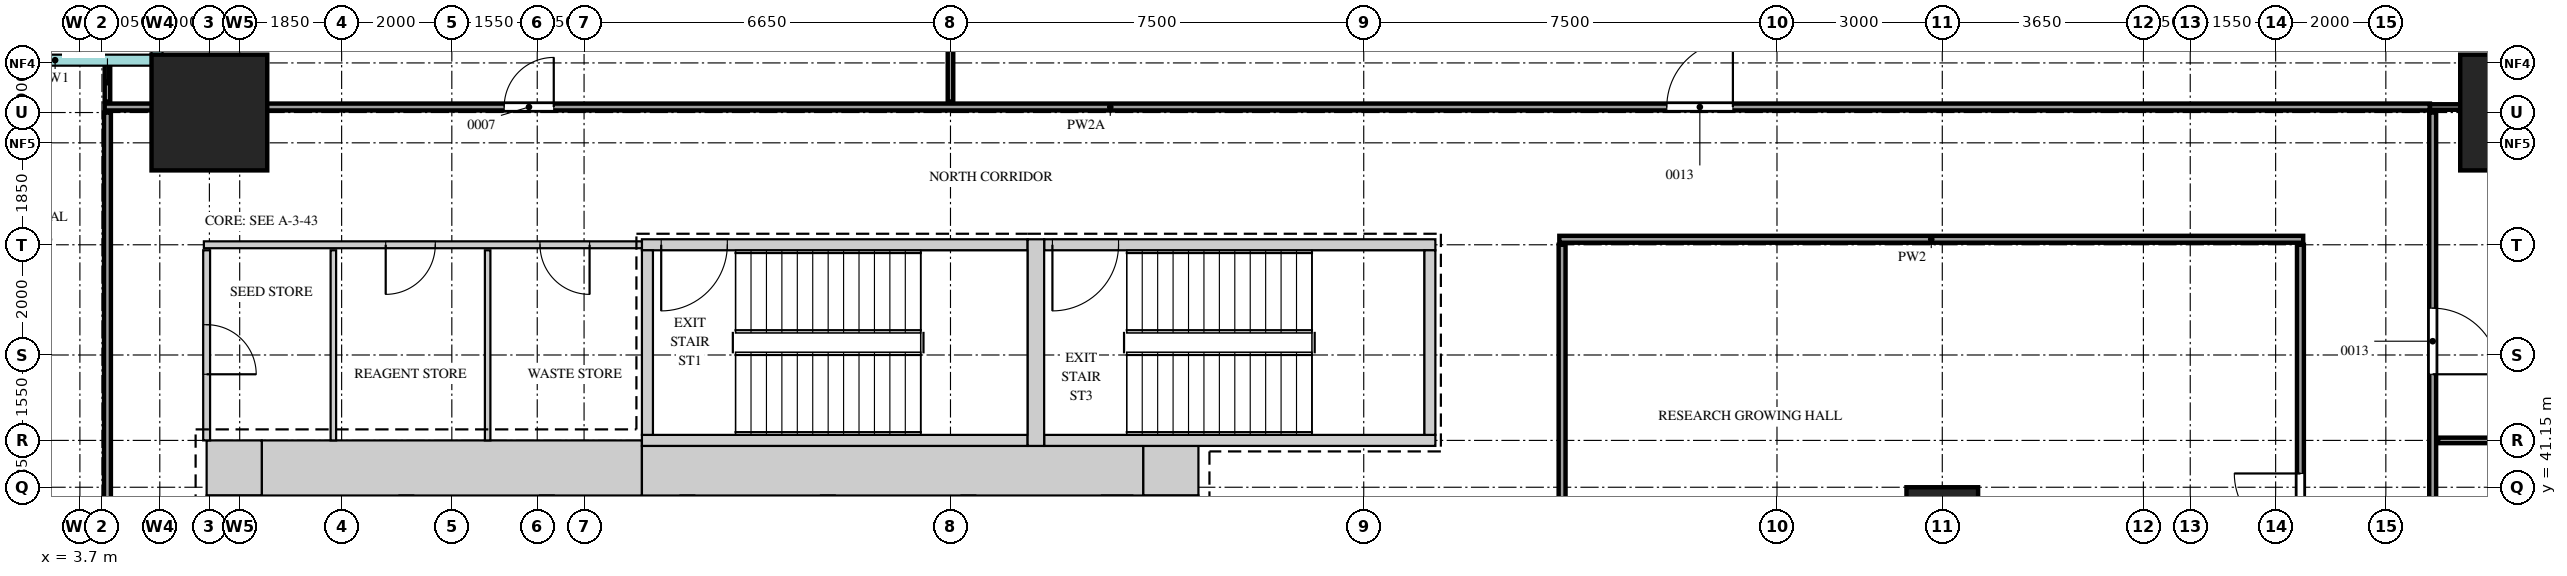
"""IFC4 building model, lengths in metres.
Left out: names, types, materials, properties, quantities, classifications, styles, units other than length and angle.
Written with IfcOpenShell. Run it as: python <this file> out.ifc"""

import sys

from ifc_helpers import new_model, si_unit, direction, frame, frame_2d, origin, origin_2d, place, context, subcontext, project, spatial, rectangle, extrude, source, transform, mapped, element, fill, save


model = new_model("IFC4")
c1 = context("Model", 3, precision=1e-05, world=origin(), true_north=direction((0.0, 1.0)))
c2 = subcontext(c1, "Body", "Model", "MODEL_VIEW")
j1 = project(units=[si_unit("LENGTHUNIT", "METRE"), si_unit("PLANEANGLEUNIT", "RADIAN")], contexts=[c1])
p1 = place(None, origin())
s1 = spatial("IfcSite", under=j1, at=p1, CompositionType="ELEMENT")
p2 = place(p1, origin())
s2 = spatial("IfcBuilding", under=s1, at=p2, CompositionType="ELEMENT")
p3 = place(p2, frame((0.0, 0.0, 105.9)))
s3 = spatial("IfcBuildingStorey", under=s2, at=p3, CompositionType="ELEMENT", Elevation=105.9)
m1 = source(origin(), c2, "Body", "SweptSolid", [
    extrude(rectangle(XDim=6.9, YDim=1.0, at=frame_2d((3.45, 0.0))), origin(), (0.0, 0.0, 1.0), 4.1),
])
p4 = place(p3, frame((7.0, 41.5, 0.0), z_axis=(0.0, 0.0, 1.0), x_axis=(1.0, 0.0, 0.0)))
e1 = element("IfcWall", 1, at=p4, inside=s3, PredefinedType="SHEAR", context=c2, shape_type="MappedRepresentation", body=[
    mapped(m1, transform((0.0, 0.0, 0.0))),
])
m2 = source(origin(), c2, "Body", "SweptSolid", [
    extrude(rectangle(XDim=9.1, YDim=0.9, at=frame_2d((4.55, 0.0))), origin(), (0.0, 0.0, 1.0), 4.1),
])
p5 = place(p3, frame((13.9, 41.45, 0.0), z_axis=(0.0, 0.0, 1.0), x_axis=(1.0, 0.0, 0.0)))
e2 = element("IfcWall", 2, at=p5, inside=s3, PredefinedType="SHEAR", context=c2, shape_type="MappedRepresentation", body=[
    mapped(m2, transform((0.0, 0.0, 0.0))),
])
m3 = source(origin(), c2, "Body", "SweptSolid", [
    extrude(rectangle(XDim=1.0, YDim=0.9, at=frame_2d((0.5, 0.0))), origin(), (0.0, 0.0, 1.0), 4.1),
])
p6 = place(p3, frame((23.0, 41.45, 0.0), z_axis=(0.0, 0.0, 1.0), x_axis=(1.0, 0.0, 0.0)))
e3 = element("IfcWall", 3, at=p6, inside=s3, PredefinedType="SHEAR", context=c2, shape_type="MappedRepresentation", body=[
    mapped(m3, transform((0.0, 0.0, 0.0))),
])
m4 = source(origin(), c2, "Body", "SweptSolid", [
    extrude(rectangle(XDim=1.0, YDim=1.0, at=frame_2d((0.5, 0.0))), origin(), (0.0, 0.0, 1.0), 4.1),
])
p7 = place(p3, frame((6.0, 41.5, 0.0), z_axis=(0.0, 0.0, 1.0), x_axis=(1.0, 0.0, 0.0)))
e4 = element("IfcWall", 4, at=p7, inside=s3, PredefinedType="SHEAR", context=c2, shape_type="MappedRepresentation", body=[
    mapped(m4, transform((0.0, 0.0, 0.0))),
])
m5 = source(origin(), c2, "Body", "SweptSolid", [
    extrude(rectangle(XDim=7.0, YDim=0.2, at=frame_2d((3.5, 0.0))), origin(), (0.0, 0.0, 1.0), 4.1),
])
p8 = place(p3, frame((13.9, 45.55, 0.0), z_axis=(0.0, 0.0, 1.0), x_axis=(1.0, 0.0, 0.0)))
e5 = element("IfcWall", 5, at=p8, inside=s3, PredefinedType="SHEAR", context=c2, shape_type="MappedRepresentation", body=[
    mapped(m5, transform((0.0, 0.0, 0.0))),
])
m6 = source(origin(), c2, "Body", "SweptSolid", [
    extrude(rectangle(XDim=1.2, YDim=2.1, at=frame_2d((0.6, 1.05))), frame((0.0, 0.11, 0.0), z_axis=(0.0, -1.0, 0.0), x_axis=(1.0, 0.0, 0.0)), (0.0, 0.0, 1.0), 0.22),
])
p9 = place(p8, frame((0.35, 0.0, 0.0)))
e6 = element("IfcOpeningElement", 6, at=p9, cuts=e5, PredefinedType="OPENING", context=c2, shape_type="MappedRepresentation", body=[
    mapped(m6, transform((0.0, 0.0, 0.0))),
])
p10 = place(p3, frame((13.9, 42.0, 0.0), z_axis=(0.0, 0.0, 1.0), x_axis=(1.0, 0.0, 0.0)))
e7 = element("IfcWall", 7, at=p10, inside=s3, PredefinedType="SHEAR", context=c2, shape_type="MappedRepresentation", body=[
    mapped(m5, transform((0.0, 0.0, 0.0))),
])
m7 = source(origin(), c2, "Body", "SweptSolid", [
    extrude(rectangle(XDim=7.1, YDim=0.2, at=frame_2d((3.55, 0.0))), origin(), (0.0, 0.0, 1.0), 4.1),
])
p11 = place(p3, frame((21.2, 45.55, 0.0), z_axis=(0.0, 0.0, 1.0), x_axis=(1.0, 0.0, 0.0)))
e8 = element("IfcWall", 8, at=p11, inside=s3, PredefinedType="SHEAR", context=c2, shape_type="MappedRepresentation", body=[
    mapped(m7, transform((0.0, 0.0, 0.0))),
])
p12 = place(p11, frame((0.15, 0.0, 0.0)))
e9 = element("IfcOpeningElement", 9, at=p12, cuts=e8, PredefinedType="OPENING", context=c2, shape_type="MappedRepresentation", body=[
    mapped(m6, transform((0.0, 0.0, 0.0))),
])
p13 = place(p3, frame((21.2, 42.0, 0.0), z_axis=(0.0, 0.0, 1.0), x_axis=(1.0, 0.0, 0.0)))
e10 = element("IfcWall", 10, at=p13, inside=s3, PredefinedType="SHEAR", context=c2, shape_type="MappedRepresentation", body=[
    mapped(m7, transform((0.0, 0.0, 0.0))),
])
m8 = source(origin(), c2, "Body", "SweptSolid", [
    extrude(rectangle(XDim=3.75, YDim=0.3, at=frame_2d((1.875, 0.0))), origin(), (0.0, 0.0, 1.0), 4.1),
])
p14 = place(p3, frame((21.05, 41.9, 0.0), z_axis=(0.0, 0.0, 1.0), x_axis=(0.0, 1.0, 0.0)))
e11 = element("IfcWall", 11, at=p14, inside=s3, PredefinedType="SHEAR", context=c2, shape_type="MappedRepresentation", body=[
    mapped(m8, transform((0.0, 0.0, 0.0))),
])
m9 = source(origin(), c2, "Body", "SweptSolid", [
    extrude(rectangle(XDim=3.35, YDim=0.2, at=frame_2d((1.675, 0.0))), origin(), (0.0, 0.0, 1.0), 4.1),
])
for number, where, z_axis, x_axis in (
    (12, (14.0, 42.1, 0.0), (0.0, 0.0, 1.0), (0.0, 1.0, 0.0)),
    (13, (28.2, 42.1, 0.0), (0.0, 0.0, 1.0), (0.0, 1.0, 0.0)),
):
    element("IfcWall", number, at=place(p3, frame(where, z_axis=z_axis, x_axis=x_axis)), inside=s3, PredefinedType="SHEAR", context=c2, shape_type="MappedRepresentation", body=[
        mapped(m9, transform((0.0, 0.0, 0.0))),
    ])
m10 = source(origin(), c2, "Body", "SweptSolid", [
    extrude(rectangle(XDim=2.1, YDim=2.1, at=origin_2d()), origin(), (0.0, 0.0, 1.0), 4.4),
])
for number, where, z_axis, x_axis in (
    (14, (47.95, 47.95, 0.0), (0.0, 0.0, 1.0), (1.0, 0.0, 0.0)),
    (15, (6.05, 47.95, 0.0), (0.0, 0.0, 1.0), (1.0, 0.0, 0.0)),
):
    element("IfcColumn", number, at=place(p3, frame(where, z_axis=z_axis, x_axis=x_axis)), inside=s3, PredefinedType="COLUMN", context=c2, shape_type="MappedRepresentation", body=[
        mapped(m10, transform((0.0, 0.0, 0.0))),
    ])
m11 = source(origin(), c2, "Body", "SweptSolid", [
    extrude(rectangle(XDim=1.3, YDim=1.3, at=origin_2d()), origin(), (0.0, 0.0, 1.0), 4.1),
])
p15 = place(p3, frame((37.5, 40.5, 0.0), z_axis=(0.0, 0.0, 1.0), x_axis=(1.0, 0.0, 0.0)))
e16 = element("IfcColumn", 16, at=p15, inside=s3, PredefinedType="COLUMN", context=c2, shape_type="MappedRepresentation", body=[
    mapped(m11, transform((0.0, 0.0, 0.0))),
])
m12 = source(origin(), c2, "Body", "SweptSolid", [
    extrude(rectangle(XDim=41.8, YDim=0.125, at=frame_2d((20.9, 0.0))), origin(), (0.0, 0.0, 1.0), 4.2),
])
p16 = place(p3, frame((4.2, 6.15, 0.0), z_axis=(0.0, 0.0, 1.0), x_axis=(0.0, 1.0, 0.0)))
e17 = element("IfcWall", 17, at=p16, inside=s3, PredefinedType="PARTITIONING", context=c2, shape_type="MappedRepresentation", body=[
    mapped(m12, transform((0.0, 0.0, 0.0))),
])
m13 = source(origin(), c2, "Body", "SweptSolid", [
    extrude(rectangle(XDim=0.9, YDim=2.1, at=frame_2d((0.45, 1.05))), frame((0.0, 0.073, 0.0), z_axis=(0.0, -1.0, 0.0), x_axis=(1.0, 0.0, 0.0)), (0.0, 0.0, 1.0), 0.145),
])
p17 = place(p16, frame((7.2, 0.0, 0.0)))
e18 = element("IfcOpeningElement", 18, at=p17, cuts=e17, PredefinedType="OPENING", context=c2, shape_type="MappedRepresentation", body=[
    mapped(m13, transform((0.0, 0.0, 0.0))),
])
p18 = place(p16, frame((21.8, 0.0, 0.0)))
e19 = element("IfcOpeningElement", 19, at=p18, cuts=e17, PredefinedType="OPENING", context=c2, shape_type="MappedRepresentation", body=[
    mapped(m13, transform((0.0, 0.0, 0.0))),
])
p19 = place(p16, frame((33.3, 0.0, 0.0)))
e20 = element("IfcOpeningElement", 20, at=p19, cuts=e17, PredefinedType="OPENING", context=c2, shape_type="MappedRepresentation", body=[
    mapped(m13, transform((0.0, 0.0, 0.0))),
])
m14 = source(origin(), c2, "Body", "SweptSolid", [
    extrude(rectangle(XDim=37.65, YDim=0.125, at=frame_2d((18.825, 0.0))), origin(), (0.0, 0.0, 1.0), 4.2),
])
p20 = place(p3, frame((46.4, 10.3, 0.0), z_axis=(0.0, 0.0, 1.0), x_axis=(0.0, 1.0, 0.0)))
e21 = element("IfcWall", 21, at=p20, inside=s3, PredefinedType="PARTITIONING", context=c2, shape_type="MappedRepresentation", body=[
    mapped(m14, transform((0.0, 0.0, 0.0))),
])
m15 = source(origin(), c2, "Body", "SweptSolid", [
    extrude(rectangle(XDim=1.2, YDim=2.1, at=frame_2d((0.6, 1.05))), frame((0.0, 0.073, 0.0), z_axis=(0.0, -1.0, 0.0), x_axis=(1.0, 0.0, 0.0)), (0.0, 0.0, 1.0), 0.145),
])
p21 = place(p20, frame((7.85, 0.0, 0.0)))
e22 = element("IfcOpeningElement", 22, at=p21, cuts=e21, PredefinedType="OPENING", context=c2, shape_type="MappedRepresentation", body=[
    mapped(m15, transform((0.0, 0.0, 0.0))),
])
p22 = place(p20, frame((23.6, 0.0, 0.0)))
e23 = element("IfcOpeningElement", 23, at=p22, cuts=e21, PredefinedType="OPENING", context=c2, shape_type="MappedRepresentation", body=[
    mapped(m15, transform((0.0, 0.0, 0.0))),
])
p23 = place(p20, frame((32.9, 0.0, 0.0)))
e24 = element("IfcOpeningElement", 24, at=p23, cuts=e21, PredefinedType="OPENING", context=c2, shape_type="MappedRepresentation", body=[
    mapped(m15, transform((0.0, 0.0, 0.0))),
])
m16 = source(origin(), c2, "Body", "SweptSolid", [
    extrude(rectangle(XDim=32.85, YDim=0.125, at=frame_2d((16.425, 0.0))), origin(), (0.0, 0.0, 1.0), 4.2),
])
p24 = place(p3, frame((44.0, 12.7, 0.0), z_axis=(0.0, 0.0, 1.0), x_axis=(0.0, 1.0, 0.0)))
e25 = element("IfcWall", 25, at=p24, inside=s3, PredefinedType="PARTITIONING", context=c2, shape_type="MappedRepresentation", body=[
    mapped(m16, transform((0.0, 0.0, 0.0))),
])
p25 = place(p24, frame((9.2, 0.0, 0.0)))
e26 = element("IfcOpeningElement", 26, at=p25, cuts=e25, PredefinedType="OPENING", context=c2, shape_type="MappedRepresentation", body=[
    mapped(m15, transform((0.0, 0.0, 0.0))),
])
p26 = place(p24, frame((27.5, 0.0, 0.0)))
e27 = element("IfcOpeningElement", 27, at=p26, cuts=e25, PredefinedType="OPENING", context=c2, shape_type="MappedRepresentation", body=[
    mapped(m15, transform((0.0, 0.0, 0.0))),
])
m17 = source(origin(), c2, "Body", "SweptSolid", [
    extrude(rectangle(XDim=9.45, YDim=0.125, at=frame_2d((4.725, 0.0))), origin(), (0.0, 0.0, 1.0), 4.2),
])
p27 = place(p3, frame((30.6, 36.1, 0.0), z_axis=(0.0, 0.0, 1.0), x_axis=(0.0, 1.0, 0.0)))
e28 = element("IfcWall", 28, at=p27, inside=s3, PredefinedType="PARTITIONING", context=c2, shape_type="MappedRepresentation", body=[
    mapped(m17, transform((0.0, 0.0, 0.0))),
])
m18 = source(origin(), c2, "Body", "SweptSolid", [
    extrude(rectangle(XDim=3.45, YDim=0.125, at=frame_2d((1.725, 0.0))), origin(), (0.0, 0.0, 1.0), 4.2),
])
p28 = place(p3, frame((6.0, 42.0, 0.0), z_axis=(0.0, 0.0, 1.0), x_axis=(0.0, 1.0, 0.0)))
e29 = element("IfcWall", 29, at=p28, inside=s3, PredefinedType="PARTITIONING", context=c2, shape_type="MappedRepresentation", body=[
    mapped(m18, transform((0.0, 0.0, 0.0))),
])
p29 = place(p28, frame((1.2, 0.0, 0.0)))
e30 = element("IfcOpeningElement", 30, at=p29, cuts=e29, PredefinedType="OPENING", context=c2, shape_type="MappedRepresentation", body=[
    mapped(m13, transform((0.0, 0.0, 0.0))),
])
m19 = source(origin(), c2, "Body", "SweptSolid", [
    extrude(rectangle(XDim=3.45, YDim=0.1, at=frame_2d((1.725, 0.0))), origin(), (0.0, 0.0, 1.0), 4.2),
])
for number, where, z_axis, x_axis in (
    (31, (8.3, 42.0, 0.0), (0.0, 0.0, 1.0), (0.0, 1.0, 0.0)),
    (32, (11.1, 42.0, 0.0), (0.0, 0.0, 1.0), (0.0, 1.0, 0.0)),
):
    element("IfcWall", number, at=place(p3, frame(where, z_axis=z_axis, x_axis=x_axis)), inside=s3, PredefinedType="PARTITIONING", context=c2, shape_type="MappedRepresentation", body=[
        mapped(m19, transform((0.0, 0.0, 0.0))),
    ])
m20 = source(origin(), c2, "Body", "SweptSolid", [
    extrude(rectangle(XDim=5.85, YDim=0.1, at=frame_2d((2.925, 0.0))), origin(), (0.0, 0.0, 1.0), 4.2),
])
p30 = place(p3, frame((46.5, 42.0, 0.0), z_axis=(0.0, 0.0, 1.0), x_axis=(1.0, 0.0, 0.0)))
e33 = element("IfcWall", 33, at=p30, inside=s3, PredefinedType="PARTITIONING", context=c2, shape_type="MappedRepresentation", body=[
    mapped(m20, transform((0.0, 0.0, 0.0))),
])
m21 = source(origin(), c2, "Body", "SweptSolid", [
    extrude(rectangle(XDim=7.95, YDim=0.125, at=frame_2d((3.975, 0.0))), origin(), (0.0, 0.0, 1.0), 4.2),
])
p31 = place(p3, frame((5.95, 45.55, 0.0), z_axis=(0.0, 0.0, 1.0), x_axis=(1.0, 0.0, 0.0)))
e34 = element("IfcWall", 34, at=p31, inside=s3, PredefinedType="PARTITIONING", context=c2, shape_type="MappedRepresentation", body=[
    mapped(m21, transform((0.0, 0.0, 0.0))),
])
p32 = place(p31, frame((3.3, 0.0, 0.0)))
e35 = element("IfcOpeningElement", 35, at=p32, cuts=e34, PredefinedType="OPENING", context=c2, shape_type="MappedRepresentation", body=[
    mapped(m13, transform((0.0, 0.0, 0.0))),
])
p33 = place(p31, frame((6.1, 0.0, 0.0)))
e36 = element("IfcOpeningElement", 36, at=p33, cuts=e34, PredefinedType="OPENING", context=c2, shape_type="MappedRepresentation", body=[
    mapped(m13, transform((0.0, 0.0, 0.0))),
])
m22 = source(origin(), c2, "Body", "SweptSolid", [
    extrude(rectangle(XDim=13.5, YDim=0.125, at=frame_2d((6.75, 0.0))), origin(), (0.0, 0.0, 1.0), 4.2),
])
p34 = place(p3, frame((30.55, 45.65, 0.0), z_axis=(0.0, 0.0, 1.0), x_axis=(1.0, 0.0, 0.0)))
e37 = element("IfcWall", 37, at=p34, inside=s3, PredefinedType="PARTITIONING", context=c2, shape_type="MappedRepresentation", body=[
    mapped(m22, transform((0.0, 0.0, 0.0))),
])
m23 = source(origin(), c2, "Body", "SweptSolid", [
    extrude(rectangle(XDim=42.2, YDim=0.125, at=frame_2d((21.1, 0.0))), origin(), (0.0, 0.0, 1.0), 3.55),
])
p35 = place(p3, frame((4.15, 48.05, 0.0), z_axis=(0.0, 0.0, 1.0), x_axis=(1.0, 0.0, 0.0)))
e38 = element("IfcWall", 38, at=p35, inside=s3, PredefinedType="PARTITIONING", context=c2, shape_type="MappedRepresentation", body=[
    mapped(m23, transform((0.0, 0.0, 0.0))),
])
p36 = place(p35, frame((7.25, 0.0, 0.0)))
e39 = element("IfcOpeningElement", 39, at=p36, cuts=e38, PredefinedType="OPENING", context=c2, shape_type="MappedRepresentation", body=[
    mapped(m13, transform((0.0, 0.0, 0.0))),
])
p37 = place(p35, frame((28.35, 0.0, 0.0)))
e40 = element("IfcOpeningElement", 40, at=p37, cuts=e38, PredefinedType="OPENING", context=c2, shape_type="MappedRepresentation", body=[
    mapped(m15, transform((0.0, 0.0, 0.0))),
])
m24 = source(origin(), c2, "Body", "SweptSolid", [
    extrude(rectangle(XDim=6.0, YDim=0.1, at=frame_2d((3.0, 0.0))), origin(), (0.0, 0.0, 1.0), 3.55),
])
p38 = place(p3, frame((46.35, 48.05, 0.0), z_axis=(0.0, 0.0, 1.0), x_axis=(1.0, 0.0, 0.0)))
e41 = element("IfcWall", 41, at=p38, inside=s3, PredefinedType="PARTITIONING", context=c2, shape_type="MappedRepresentation", body=[
    mapped(m24, transform((0.0, 0.0, 0.0))),
])
m25 = source(origin(), c2, "Body", "SweptSolid", [
    extrude(rectangle(XDim=0.7, YDim=0.1, at=frame_2d((0.35, 0.0))), origin(), (0.0, 0.0, 1.0), 4.2),
])
p39 = place(p3, frame((4.2, 48.15, 0.0), z_axis=(0.0, 0.0, 1.0), x_axis=(0.0, 1.0, 0.0)))
e42 = element("IfcWall", 42, at=p39, inside=s3, PredefinedType="PARTITIONING", context=c2, shape_type="MappedRepresentation", body=[
    mapped(m25, transform((0.0, 0.0, 0.0))),
])
m26 = source(origin(), c2, "Body", "SweptSolid", [
    extrude(rectangle(XDim=4.2, YDim=0.1, at=frame_2d((2.1, 0.0))), origin(), (0.0, 0.0, 1.0), 3.77),
])
p40 = place(p3, frame((19.5, 48.15, 0.0), z_axis=(0.0, 0.0, 1.0), x_axis=(0.0, 1.0, 0.0)))
e43 = element("IfcWall", 43, at=p40, inside=s3, PredefinedType="PARTITIONING", context=c2, shape_type="MappedRepresentation", body=[
    mapped(m26, transform((0.0, 0.0, 0.0))),
])
m27 = source(origin(), c2, "Body", "SweptSolid", [
    extrude(rectangle(XDim=1.2, YDim=2.1, at=frame_2d((0.6, 1.05))), frame((0.0, 0.025, 0.0), z_axis=(0.0, -1.0, 0.0), x_axis=(1.0, 0.0, 0.0)), (0.0, 0.0, 1.0), 0.05),
])
p41 = place(p26, origin())
e44 = element("IfcDoor", 44, at=p41, inside=s3, OperationType="SINGLE_SWING_LEFT", PredefinedType="DOOR", context=c2, shape_type="MappedRepresentation", body=[
    mapped(m27, transform((0.0, 0.0, 0.0))),
])
fill(e27, e44)
p42 = place(p23, origin())
e45 = element("IfcDoor", 45, at=p42, inside=s3, OperationType="SINGLE_SWING_LEFT", PredefinedType="DOOR", context=c2, shape_type="MappedRepresentation", body=[
    mapped(m27, transform((0.0, 0.0, 0.0))),
])
fill(e24, e45)
m28 = source(origin(), c2, "Body", "SweptSolid", [
    extrude(rectangle(XDim=0.9, YDim=2.1, at=frame_2d((0.45, 1.05))), frame((0.0, 0.025, 0.0), z_axis=(0.0, -1.0, 0.0), x_axis=(1.0, 0.0, 0.0)), (0.0, 0.0, 1.0), 0.05),
])
p43 = place(p36, origin())
e46 = element("IfcDoor", 46, at=p43, inside=s3, OperationType="SINGLE_SWING_LEFT", PredefinedType="DOOR", context=c2, shape_type="MappedRepresentation", body=[
    mapped(m28, transform((0.0, 0.0, 0.0))),
])
fill(e39, e46)
p44 = place(p37, origin())
e47 = element("IfcDoor", 47, at=p44, inside=s3, OperationType="SINGLE_SWING_LEFT", PredefinedType="DOOR", context=c2, shape_type="MappedRepresentation", body=[
    mapped(m27, transform((0.0, 0.0, 0.0))),
])
fill(e40, e47)
p45 = place(p29, origin())
e48 = element("IfcDoor", 48, at=p45, inside=s3, OperationType="SINGLE_SWING_LEFT", PredefinedType="DOOR", context=c2, shape_type="MappedRepresentation", body=[
    mapped(m28, transform((0.0, 0.0, 0.0))),
])
fill(e30, e48)
p46 = place(p32, origin())
e49 = element("IfcDoor", 49, at=p46, inside=s3, OperationType="SINGLE_SWING_LEFT", PredefinedType="DOOR", context=c2, shape_type="MappedRepresentation", body=[
    mapped(m28, transform((0.0, 0.0, 0.0))),
])
fill(e35, e49)
p47 = place(p33, origin())
e50 = element("IfcDoor", 50, at=p47, inside=s3, OperationType="SINGLE_SWING_RIGHT", PredefinedType="DOOR", context=c2, shape_type="MappedRepresentation", body=[
    mapped(m28, transform((0.0, 0.0, 0.0))),
])
fill(e36, e50)
p48 = place(p9, origin())
e51 = element("IfcDoor", 51, at=p48, inside=s3, OperationType="SINGLE_SWING_LEFT", PredefinedType="DOOR", context=c2, shape_type="MappedRepresentation", body=[
    mapped(m27, transform((0.0, 0.0, 0.0))),
])
fill(e6, e51)
p49 = place(p12, origin())
e52 = element("IfcDoor", 52, at=p49, inside=s3, OperationType="SINGLE_SWING_LEFT", PredefinedType="DOOR", context=c2, shape_type="MappedRepresentation", body=[
    mapped(m27, transform((0.0, 0.0, 0.0))),
])
fill(e9, e52)
save(model, sys.argv[1])
